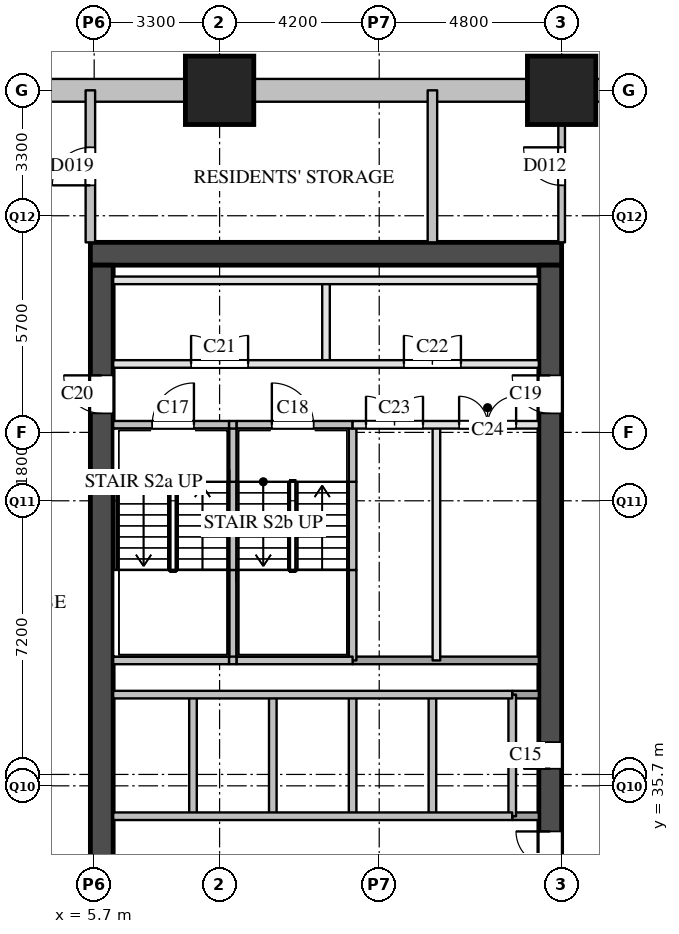
"""IFC4 building model, lengths in metres.
Left out: names, types, materials, properties, quantities, classifications, styles, units other than length and angle.
Written with IfcOpenShell. Run it as: python <this file> out.ifc"""

import sys

from ifc_helpers import new_model, si_unit, direction, frame, frame_2d, origin, origin_2d, place, context, subcontext, project, spatial, rectangle, extrude, element, fill, save


model = new_model("IFC4")
c1 = context("Model", 3, precision=1e-05, world=origin(), true_north=direction((0.0, 1.0)))
c2 = subcontext(c1, "Body", "Model", "MODEL_VIEW")
j1 = project(units=[si_unit("LENGTHUNIT", "METRE"), si_unit("PLANEANGLEUNIT", "RADIAN")], contexts=[c1])
p1 = place(None, origin())
s1 = spatial("IfcSite", under=j1, at=p1, CompositionType="ELEMENT")
p2 = place(p1, origin())
s2 = spatial("IfcBuilding", under=s1, at=p2, CompositionType="ELEMENT")
p3 = place(p2, frame((0.0, 0.0, -6.0)))
s3 = spatial("IfcBuildingStorey", under=s2, at=p3, CompositionType="ELEMENT", Elevation=-6.0)
for number, where, z_axis, x_axis in (
    (1, (9.0, 54.0, 0.0), (0.0, 0.0, 1.0), (1.0, 0.0, 0.0)),
    (2, (18.0, 54.0, 0.0), (0.0, 0.0, 1.0), (1.0, 0.0, 0.0)),
):
    element("IfcColumn", number, at=place(p3, frame(where, z_axis=z_axis, x_axis=x_axis)), inside=s3, PredefinedType="COLUMN", context=c2, shape_type="SweptSolid", body=[
        extrude(rectangle(XDim=1.8, YDim=1.8, at=origin_2d()), origin(), (0.0, 0.0, 1.0), 6.0),
    ])
for number, where, z_axis, x_axis in (
    (3, (26.1, 54.0, 0.0), (0.0, 0.0, 1.0), (-1.0, 0.0, 0.0)),
    (4, (17.1, 54.0, 0.0), (0.0, 0.0, 1.0), (-1.0, 0.0, 0.0)),
):
    element("IfcWall", number, at=place(p3, frame(where, z_axis=z_axis, x_axis=x_axis)), inside=s3, PredefinedType="SOLIDWALL", context=c2, shape_type="SweptSolid", body=[
        extrude(rectangle(XDim=7.2, YDim=0.6, at=frame_2d((3.6, 0.0))), origin(), (0.0, 0.0, 1.0), 5.59),
    ])
p4 = place(p3, frame((8.1, 54.0, 0.0), z_axis=(0.0, 0.0, 1.0), x_axis=(-1.0, 0.0, 0.0)))
e5 = element("IfcWall", 5, at=p4, inside=s3, PredefinedType="SOLIDWALL", context=c2, shape_type="SweptSolid", body=[
    extrude(rectangle(XDim=3.6, YDim=0.6, at=frame_2d((1.8, 0.0))), origin(), (0.0, 0.0, 1.0), 5.59),
])
p5 = place(p3, frame((5.6, 49.7, 0.0), z_axis=(0.0, 0.0, 1.0), x_axis=(1.0, 0.0, 0.0)))
e6 = element("IfcWall", 6, at=p5, inside=s3, PredefinedType="SHEAR", context=c2, shape_type="SweptSolid", body=[
    extrude(rectangle(XDim=12.4, YDim=0.6, at=frame_2d((6.2, 0.0))), origin(), (0.0, 0.0, 1.0), 5.59),
])
p6 = place(p3, frame((5.9, 29.1, 0.0), z_axis=(0.0, 0.0, 1.0), x_axis=(0.0, 1.0, 0.0)))
e7 = element("IfcWall", 7, at=p6, inside=s3, PredefinedType="SHEAR", context=c2, shape_type="SweptSolid", body=[
    extrude(rectangle(XDim=20.3, YDim=0.6, at=frame_2d((10.15, 0.0))), origin(), (0.0, 0.0, 1.0), 5.59),
])
p7 = place(p6, frame((16.4, 0.0, 0.0)))
e8 = element("IfcOpeningElement", 8, at=p7, cuts=e7, PredefinedType="OPENING", context=c2, shape_type="SweptSolid", body=[
    extrude(rectangle(XDim=1.0, YDim=2.1, at=frame_2d((0.5, 1.05))), frame((0.0, 0.31, 0.0), z_axis=(0.0, -1.0, 0.0), x_axis=(1.0, 0.0, 0.0)), (0.0, 0.0, 1.0), 0.62),
])
p8 = place(p3, frame((17.7, 29.1, 0.0), z_axis=(0.0, 0.0, 1.0), x_axis=(0.0, 1.0, 0.0)))
e9 = element("IfcWall", 9, at=p8, inside=s3, PredefinedType="SHEAR", context=c2, shape_type="SweptSolid", body=[
    extrude(rectangle(XDim=20.3, YDim=0.6, at=frame_2d((10.15, 0.0))), origin(), (0.0, 0.0, 1.0), 5.59),
])
p9 = place(p8, frame((1.25, 0.0, 0.0)))
e10 = element("IfcOpeningElement", 10, at=p9, cuts=e9, PredefinedType="OPENING", context=c2, shape_type="SweptSolid", body=[
    extrude(rectangle(XDim=0.7, YDim=2.1, at=frame_2d((0.35, 1.05))), frame((0.0, 0.31, 0.0), z_axis=(0.0, -1.0, 0.0), x_axis=(1.0, 0.0, 0.0)), (0.0, 0.0, 1.0), 0.62),
])
p10 = place(p8, frame((7.05, 0.0, 0.0)))
e11 = element("IfcOpeningElement", 11, at=p10, cuts=e9, PredefinedType="OPENING", context=c2, shape_type="SweptSolid", body=[
    extrude(rectangle(XDim=0.7, YDim=2.1, at=frame_2d((0.35, 1.05))), frame((0.0, 0.31, 0.0), z_axis=(0.0, -1.0, 0.0), x_axis=(1.0, 0.0, 0.0)), (0.0, 0.0, 1.0), 0.62),
])
p11 = place(p8, frame((3.6, 0.0, 0.0)))
e12 = element("IfcOpeningElement", 12, at=p11, cuts=e9, PredefinedType="OPENING", context=c2, shape_type="SweptSolid", body=[
    extrude(rectangle(XDim=1.8, YDim=2.1, at=frame_2d((0.9, 1.05))), frame((0.0, 0.31, 0.0), z_axis=(0.0, -1.0, 0.0), x_axis=(1.0, 0.0, 0.0)), (0.0, 0.0, 1.0), 0.62),
])
p12 = place(p8, frame((16.4, 0.0, 0.0)))
e13 = element("IfcOpeningElement", 13, at=p12, cuts=e9, PredefinedType="OPENING", context=c2, shape_type="SweptSolid", body=[
    extrude(rectangle(XDim=1.0, YDim=2.1, at=frame_2d((0.5, 1.05))), frame((0.0, 0.31, 0.0), z_axis=(0.0, -1.0, 0.0), x_axis=(1.0, 0.0, 0.0)), (0.0, 0.0, 1.0), 0.62),
])
p13 = place(p3, frame((8.3, 34.9, 0.0), z_axis=(0.0, 0.0, 1.0), x_axis=(0.0, 1.0, 0.0)))
e14 = element("IfcWall", 14, at=p13, inside=s3, PredefinedType="SOLIDWALL", context=c2, shape_type="SweptSolid", body=[
    extrude(rectangle(XDim=3.2, YDim=0.2, at=frame_2d((1.6, 0.0))), origin(), (0.0, 0.0, 1.0), 5.59),
])
p14 = place(p3, frame((9.35, 39.0, 0.0), z_axis=(0.0, 0.0, 1.0), x_axis=(0.0, 1.0, 0.0)))
e15 = element("IfcWall", 15, at=p14, inside=s3, PredefinedType="SOLIDWALL", context=c2, shape_type="SweptSolid", body=[
    extrude(rectangle(XDim=2.38, YDim=0.2, at=frame_2d((1.19, 0.0))), origin(), (0.0, 0.0, 1.0), 5.59),
])
p15 = place(p3, frame((9.35, 41.38, 0.0), z_axis=(0.0, 0.0, 1.0), x_axis=(0.0, 1.0, 0.0)))
e16 = element("IfcWall", 16, at=p15, inside=s3, PredefinedType="SOLIDWALL", context=c2, shape_type="SweptSolid", body=[
    extrude(rectangle(XDim=2.32, YDim=0.2, at=frame_2d((1.16, 0.0))), origin(), (0.0, 0.0, 1.0), 5.59),
])
p16 = place(p3, frame((9.35, 43.7, 0.0), z_axis=(0.0, 0.0, 1.0), x_axis=(0.0, 1.0, 0.0)))
e17 = element("IfcWall", 17, at=p16, inside=s3, PredefinedType="SOLIDWALL", context=c2, shape_type="SweptSolid", body=[
    extrude(rectangle(XDim=1.5, YDim=0.2, at=frame_2d((0.75, 0.0))), origin(), (0.0, 0.0, 1.0), 5.59),
])
p17 = place(p3, frame((10.4, 34.9, 0.0), z_axis=(0.0, 0.0, 1.0), x_axis=(0.0, 1.0, 0.0)))
e18 = element("IfcWall", 18, at=p17, inside=s3, PredefinedType="SOLIDWALL", context=c2, shape_type="SweptSolid", body=[
    extrude(rectangle(XDim=3.2, YDim=0.2, at=frame_2d((1.6, 0.0))), origin(), (0.0, 0.0, 1.0), 5.59),
])
p18 = place(p3, frame((11.8, 46.8, 0.0), z_axis=(0.0, 0.0, 1.0), x_axis=(0.0, 1.0, 0.0)))
e19 = element("IfcWall", 19, at=p18, inside=s3, PredefinedType="PARTITIONING", context=c2, shape_type="SweptSolid", body=[
    extrude(rectangle(XDim=2.2, YDim=0.2, at=frame_2d((1.1, 0.0))), origin(), (0.0, 0.0, 1.0), 5.59),
])
p19 = place(p3, frame((12.5, 34.9, 0.0), z_axis=(0.0, 0.0, 1.0), x_axis=(0.0, 1.0, 0.0)))
e20 = element("IfcWall", 20, at=p19, inside=s3, PredefinedType="SOLIDWALL", context=c2, shape_type="SweptSolid", body=[
    extrude(rectangle(XDim=3.2, YDim=0.2, at=frame_2d((1.6, 0.0))), origin(), (0.0, 0.0, 1.0), 5.59),
])
p20 = place(p3, frame((12.5, 39.0, 0.0), z_axis=(0.0, 0.0, 1.0), x_axis=(0.0, 1.0, 0.0)))
e21 = element("IfcWall", 21, at=p20, inside=s3, PredefinedType="SOLIDWALL", context=c2, shape_type="SweptSolid", body=[
    extrude(rectangle(XDim=2.38, YDim=0.2, at=frame_2d((1.19, 0.0))), origin(), (0.0, 0.0, 1.0), 5.59),
])
p21 = place(p3, frame((12.5, 41.38, 0.0), z_axis=(0.0, 0.0, 1.0), x_axis=(0.0, 1.0, 0.0)))
e22 = element("IfcWall", 22, at=p21, inside=s3, PredefinedType="SOLIDWALL", context=c2, shape_type="SweptSolid", body=[
    extrude(rectangle(XDim=2.32, YDim=0.2, at=frame_2d((1.16, 0.0))), origin(), (0.0, 0.0, 1.0), 5.59),
])
p22 = place(p3, frame((12.5, 43.7, 0.0), z_axis=(0.0, 0.0, 1.0), x_axis=(0.0, 1.0, 0.0)))
e23 = element("IfcWall", 23, at=p22, inside=s3, PredefinedType="SOLIDWALL", context=c2, shape_type="SweptSolid", body=[
    extrude(rectangle(XDim=1.5, YDim=0.2, at=frame_2d((0.75, 0.0))), origin(), (0.0, 0.0, 1.0), 5.59),
])
p23 = place(p3, frame((14.6, 34.9, 0.0), z_axis=(0.0, 0.0, 1.0), x_axis=(0.0, 1.0, 0.0)))
e24 = element("IfcWall", 24, at=p23, inside=s3, PredefinedType="SOLIDWALL", context=c2, shape_type="SweptSolid", body=[
    extrude(rectangle(XDim=3.2, YDim=0.2, at=frame_2d((1.6, 0.0))), origin(), (0.0, 0.0, 1.0), 5.59),
])
p24 = place(p3, frame((14.705, 39.0, 0.0), z_axis=(0.0, 0.0, 1.0), x_axis=(0.0, 1.0, 0.0)))
e25 = element("IfcWall", 25, at=p24, inside=s3, PredefinedType="PARTITIONING", context=c2, shape_type="SweptSolid", body=[
    extrude(rectangle(XDim=6.2, YDim=0.2, at=frame_2d((3.1, 0.0))), origin(), (0.0, 0.0, 1.0), 5.59),
])
p25 = place(p3, frame((16.7, 34.9, 0.0), z_axis=(0.0, 0.0, 1.0), x_axis=(0.0, 1.0, 0.0)))
e26 = element("IfcWall", 26, at=p25, inside=s3, PredefinedType="SOLIDWALL", context=c2, shape_type="SweptSolid", body=[
    extrude(rectangle(XDim=3.2, YDim=0.2, at=frame_2d((1.6, 0.0))), origin(), (0.0, 0.0, 1.0), 5.59),
])
p26 = place(p3, frame((6.2, 34.9, 0.0), z_axis=(0.0, 0.0, 1.0), x_axis=(1.0, 0.0, 0.0)))
e27 = element("IfcWall", 27, at=p26, inside=s3, PredefinedType="SOLIDWALL", context=c2, shape_type="SweptSolid", body=[
    extrude(rectangle(XDim=10.5, YDim=0.2, at=frame_2d((5.25, 0.0))), origin(), (0.0, 0.0, 1.0), 5.59),
])
p27 = place(p3, frame((16.7, 34.9, 0.0), z_axis=(0.0, 0.0, 1.0), x_axis=(1.0, 0.0, 0.0)))
e28 = element("IfcWall", 28, at=p27, inside=s3, PredefinedType="SOLIDWALL", context=c2, shape_type="SweptSolid", body=[
    extrude(rectangle(XDim=0.7, YDim=0.2, at=frame_2d((0.35, 0.0))), origin(), (0.0, 0.0, 1.0), 5.59),
])
p28 = place(p3, frame((6.2, 38.1, 0.0), z_axis=(0.0, 0.0, 1.0), x_axis=(1.0, 0.0, 0.0)))
e29 = element("IfcWall", 29, at=p28, inside=s3, PredefinedType="SOLIDWALL", context=c2, shape_type="SweptSolid", body=[
    extrude(rectangle(XDim=10.5, YDim=0.2, at=frame_2d((5.25, 0.0))), origin(), (0.0, 0.0, 1.0), 5.59),
])
p29 = place(p3, frame((16.7, 38.1, 0.0), z_axis=(0.0, 0.0, 1.0), x_axis=(1.0, 0.0, 0.0)))
e30 = element("IfcWall", 30, at=p29, inside=s3, PredefinedType="SOLIDWALL", context=c2, shape_type="SweptSolid", body=[
    extrude(rectangle(XDim=0.7, YDim=0.2, at=frame_2d((0.35, 0.0))), origin(), (0.0, 0.0, 1.0), 5.59),
])
p30 = place(p3, frame((12.5, 39.0, 0.0), z_axis=(0.0, 0.0, 1.0), x_axis=(1.0, 0.0, 0.0)))
e31 = element("IfcWall", 31, at=p30, inside=s3, PredefinedType="SOLIDWALL", context=c2, shape_type="SweptSolid", body=[
    extrude(rectangle(XDim=4.9, YDim=0.2, at=frame_2d((2.45, 0.0))), origin(), (0.0, 0.0, 1.0), 5.59),
])
p31 = place(p3, frame((6.2, 39.0, 0.0), z_axis=(0.0, 0.0, 1.0), x_axis=(1.0, 0.0, 0.0)))
e32 = element("IfcWall", 32, at=p31, inside=s3, PredefinedType="SOLIDWALL", context=c2, shape_type="SweptSolid", body=[
    extrude(rectangle(XDim=3.05, YDim=0.2, at=frame_2d((1.525, 0.0))), origin(), (0.0, 0.0, 1.0), 5.59),
])
p32 = place(p3, frame((9.25, 39.0, 0.0), z_axis=(0.0, 0.0, 1.0), x_axis=(1.0, 0.0, 0.0)))
e33 = element("IfcWall", 33, at=p32, inside=s3, PredefinedType="SOLIDWALL", context=c2, shape_type="SweptSolid", body=[
    extrude(rectangle(XDim=0.2, YDim=0.2, at=frame_2d((0.1, 0.0))), origin(), (0.0, 0.0, 1.0), 5.59),
])
p33 = place(p3, frame((9.45, 39.0, 0.0), z_axis=(0.0, 0.0, 1.0), x_axis=(1.0, 0.0, 0.0)))
e34 = element("IfcWall", 34, at=p33, inside=s3, PredefinedType="SOLIDWALL", context=c2, shape_type="SweptSolid", body=[
    extrude(rectangle(XDim=3.05, YDim=0.2, at=frame_2d((1.525, 0.0))), origin(), (0.0, 0.0, 1.0), 5.59),
])
p34 = place(p3, frame((12.5, 45.2, 0.0), z_axis=(0.0, 0.0, 1.0), x_axis=(1.0, 0.0, 0.0)))
e35 = element("IfcWall", 35, at=p34, inside=s3, PredefinedType="PARTITIONING", context=c2, shape_type="SweptSolid", body=[
    extrude(rectangle(XDim=4.9, YDim=0.2, at=frame_2d((2.45, 0.0))), origin(), (0.0, 0.0, 1.0), 5.59),
])
p35 = place(p34, frame((0.353, 0.0, 0.0)))
e36 = element("IfcOpeningElement", 36, at=p35, cuts=e35, PredefinedType="OPENING", context=c2, shape_type="SweptSolid", body=[
    extrude(rectangle(XDim=1.5, YDim=2.1, at=frame_2d((0.75, 1.05))), frame((0.0, 0.11, 0.0), z_axis=(0.0, -1.0, 0.0), x_axis=(1.0, 0.0, 0.0)), (0.0, 0.0, 1.0), 0.22),
])
p36 = place(p34, frame((2.802, 0.0, 0.0)))
e37 = element("IfcOpeningElement", 37, at=p36, cuts=e35, PredefinedType="OPENING", context=c2, shape_type="SweptSolid", body=[
    extrude(rectangle(XDim=1.5, YDim=2.1, at=frame_2d((0.75, 1.05))), frame((0.0, 0.11, 0.0), z_axis=(0.0, -1.0, 0.0), x_axis=(1.0, 0.0, 0.0)), (0.0, 0.0, 1.0), 0.22),
])
p37 = place(p3, frame((6.2, 45.2, 0.0), z_axis=(0.0, 0.0, 1.0), x_axis=(1.0, 0.0, 0.0)))
e38 = element("IfcWall", 38, at=p37, inside=s3, PredefinedType="SOLIDWALL", context=c2, shape_type="SweptSolid", body=[
    extrude(rectangle(XDim=3.05, YDim=0.2, at=frame_2d((1.525, 0.0))), origin(), (0.0, 0.0, 1.0), 5.59),
])
p38 = place(p37, frame((1.025, 0.0, 0.0)))
e39 = element("IfcOpeningElement", 39, at=p38, cuts=e38, PredefinedType="OPENING", context=c2, shape_type="SweptSolid", body=[
    extrude(rectangle(XDim=1.1, YDim=2.1, at=frame_2d((0.55, 1.05))), frame((0.0, 0.11, 0.0), z_axis=(0.0, -1.0, 0.0), x_axis=(1.0, 0.0, 0.0)), (0.0, 0.0, 1.0), 0.22),
])
p39 = place(p3, frame((9.25, 45.2, 0.0), z_axis=(0.0, 0.0, 1.0), x_axis=(1.0, 0.0, 0.0)))
e40 = element("IfcWall", 40, at=p39, inside=s3, PredefinedType="SOLIDWALL", context=c2, shape_type="SweptSolid", body=[
    extrude(rectangle(XDim=0.2, YDim=0.2, at=frame_2d((0.1, 0.0))), origin(), (0.0, 0.0, 1.0), 5.59),
])
p40 = place(p3, frame((9.45, 45.2, 0.0), z_axis=(0.0, 0.0, 1.0), x_axis=(1.0, 0.0, 0.0)))
e41 = element("IfcWall", 41, at=p40, inside=s3, PredefinedType="SOLIDWALL", context=c2, shape_type="SweptSolid", body=[
    extrude(rectangle(XDim=3.05, YDim=0.2, at=frame_2d((1.525, 0.0))), origin(), (0.0, 0.0, 1.0), 5.59),
])
p41 = place(p40, frame((0.925, 0.0, 0.0)))
e42 = element("IfcOpeningElement", 42, at=p41, cuts=e41, PredefinedType="OPENING", context=c2, shape_type="SweptSolid", body=[
    extrude(rectangle(XDim=1.1, YDim=2.1, at=frame_2d((0.55, 1.05))), frame((0.0, 0.11, 0.0), z_axis=(0.0, -1.0, 0.0), x_axis=(1.0, 0.0, 0.0)), (0.0, 0.0, 1.0), 0.22),
])
p42 = place(p3, frame((6.2, 46.8, 0.0), z_axis=(0.0, 0.0, 1.0), x_axis=(1.0, 0.0, 0.0)))
e43 = element("IfcWall", 43, at=p42, inside=s3, PredefinedType="PARTITIONING", context=c2, shape_type="SweptSolid", body=[
    extrude(rectangle(XDim=11.2, YDim=0.2, at=frame_2d((5.6, 0.0))), origin(), (0.0, 0.0, 1.0), 5.59),
])
p43 = place(p42, frame((2.05, 0.0, 0.0)))
e44 = element("IfcOpeningElement", 44, at=p43, cuts=e43, PredefinedType="OPENING", context=c2, shape_type="SweptSolid", body=[
    extrude(rectangle(XDim=1.5, YDim=2.1, at=frame_2d((0.75, 1.05))), frame((0.0, 0.11, 0.0), z_axis=(0.0, -1.0, 0.0), x_axis=(1.0, 0.0, 0.0)), (0.0, 0.0, 1.0), 0.22),
])
p44 = place(p42, frame((7.65, 0.0, 0.0)))
e45 = element("IfcOpeningElement", 45, at=p44, cuts=e43, PredefinedType="OPENING", context=c2, shape_type="SweptSolid", body=[
    extrude(rectangle(XDim=1.5, YDim=2.1, at=frame_2d((0.75, 1.05))), frame((0.0, 0.11, 0.0), z_axis=(0.0, -1.0, 0.0), x_axis=(1.0, 0.0, 0.0)), (0.0, 0.0, 1.0), 0.22),
])
p45 = place(p3, frame((6.2, 49.0, 0.0), z_axis=(0.0, 0.0, 1.0), x_axis=(1.0, 0.0, 0.0)))
e46 = element("IfcWall", 46, at=p45, inside=s3, PredefinedType="PARTITIONING", context=c2, shape_type="SweptSolid", body=[
    extrude(rectangle(XDim=11.2, YDim=0.2, at=frame_2d((5.6, 0.0))), origin(), (0.0, 0.0, 1.0), 5.59),
])
p46 = place(p3, frame((18.0, 50.0, 0.0), z_axis=(0.0, 0.0, 1.0), x_axis=(0.0, 1.0, 0.0)))
e47 = element("IfcWall", 47, at=p46, inside=s3, PredefinedType="PARTITIONING", context=c2, shape_type="SweptSolid", body=[
    extrude(rectangle(XDim=4.0, YDim=0.175, at=frame_2d((2.0, 0.0))), origin(), (0.0, 0.0, 1.0), 5.59),
])
p47 = place(p46, frame((1.5, 0.0, 0.0)))
e48 = element("IfcOpeningElement", 48, at=p47, cuts=e47, PredefinedType="OPENING", context=c2, shape_type="SweptSolid", body=[
    extrude(rectangle(XDim=1.0, YDim=2.1, at=frame_2d((0.5, 1.05))), frame((0.0, 0.097, 0.0), z_axis=(0.0, -1.0, 0.0), x_axis=(1.0, 0.0, 0.0)), (0.0, 0.0, 1.0), 0.195),
])
p48 = place(p3, frame((5.6, 50.0, 0.0), z_axis=(0.0, 0.0, 1.0), x_axis=(0.0, 1.0, 0.0)))
e49 = element("IfcWall", 49, at=p48, inside=s3, PredefinedType="PARTITIONING", context=c2, shape_type="SweptSolid", body=[
    extrude(rectangle(XDim=4.0, YDim=0.25, at=frame_2d((2.0, 0.0))), origin(), (0.0, 0.0, 1.0), 5.59),
])
p49 = place(p48, frame((1.5, 0.0, 0.0)))
e50 = element("IfcOpeningElement", 50, at=p49, cuts=e49, PredefinedType="OPENING", context=c2, shape_type="SweptSolid", body=[
    extrude(rectangle(XDim=1.0, YDim=2.1, at=frame_2d((0.5, 1.05))), frame((0.0, 0.135, 0.0), z_axis=(0.0, -1.0, 0.0), x_axis=(1.0, 0.0, 0.0)), (0.0, 0.0, 1.0), 0.27),
])
p50 = place(p3, frame((14.6, 50.0, 0.0), z_axis=(0.0, 0.0, 1.0), x_axis=(0.0, 1.0, 0.0)))
e51 = element("IfcWall", 51, at=p50, inside=s3, PredefinedType="PARTITIONING", context=c2, shape_type="SweptSolid", body=[
    extrude(rectangle(XDim=4.0, YDim=0.25, at=frame_2d((2.0, 0.0))), origin(), (0.0, 0.0, 1.0), 5.59),
])
p51 = place(p10, origin())
e52 = element("IfcDoor", 52, at=p51, inside=s3, OperationType="SINGLE_SWING_LEFT", PredefinedType="DOOR", context=c2, shape_type="SweptSolid", body=[
    extrude(rectangle(XDim=0.7, YDim=2.1, at=frame_2d((0.35, 1.05))), frame((0.0, 0.025, 0.0), z_axis=(0.0, -1.0, 0.0), x_axis=(1.0, 0.0, 0.0)), (0.0, 0.0, 1.0), 0.05),
])
fill(e11, e52)
p52 = place(p11, origin())
e53 = element("IfcDoor", 53, at=p52, inside=s3, OperationType="DOUBLE_DOOR_SINGLE_SWING", PredefinedType="DOOR", context=c2, shape_type="SweptSolid", body=[
    extrude(rectangle(XDim=1.8, YDim=2.1, at=frame_2d((0.9, 1.05))), frame((0.0, 0.025, 0.0), z_axis=(0.0, -1.0, 0.0), x_axis=(1.0, 0.0, 0.0)), (0.0, 0.0, 1.0), 0.05),
])
fill(e12, e53)
p53 = place(p38, origin())
e54 = element("IfcDoor", 54, at=p53, inside=s3, OperationType="SINGLE_SWING_RIGHT", PredefinedType="DOOR", context=c2, shape_type="SweptSolid", body=[
    extrude(rectangle(XDim=1.1, YDim=2.1, at=frame_2d((0.55, 1.05))), frame((0.0, 0.025, 0.0), z_axis=(0.0, -1.0, 0.0), x_axis=(1.0, 0.0, 0.0)), (0.0, 0.0, 1.0), 0.05),
])
fill(e39, e54)
p54 = place(p41, origin())
e55 = element("IfcDoor", 55, at=p54, inside=s3, OperationType="SINGLE_SWING_LEFT", PredefinedType="DOOR", context=c2, shape_type="SweptSolid", body=[
    extrude(rectangle(XDim=1.1, YDim=2.1, at=frame_2d((0.55, 1.05))), frame((0.0, 0.025, 0.0), z_axis=(0.0, -1.0, 0.0), x_axis=(1.0, 0.0, 0.0)), (0.0, 0.0, 1.0), 0.05),
])
fill(e42, e55)
p55 = place(p12, origin())
e56 = element("IfcDoor", 56, at=p55, inside=s3, OperationType="SINGLE_SWING_RIGHT", PredefinedType="DOOR", context=c2, shape_type="SweptSolid", body=[
    extrude(rectangle(XDim=1.0, YDim=2.1, at=frame_2d((0.5, 1.05))), frame((0.0, 0.025, 0.0), z_axis=(0.0, -1.0, 0.0), x_axis=(1.0, 0.0, 0.0)), (0.0, 0.0, 1.0), 0.05),
])
fill(e13, e56)
p56 = place(p7, origin())
e57 = element("IfcDoor", 57, at=p56, inside=s3, OperationType="SINGLE_SWING_RIGHT", PredefinedType="DOOR", context=c2, shape_type="SweptSolid", body=[
    extrude(rectangle(XDim=1.0, YDim=2.1, at=frame_2d((0.5, 1.05))), frame((0.0, 0.025, 0.0), z_axis=(0.0, -1.0, 0.0), x_axis=(1.0, 0.0, 0.0)), (0.0, 0.0, 1.0), 0.05),
])
fill(e8, e57)
p57 = place(p43, origin())
e58 = element("IfcDoor", 58, at=p57, inside=s3, OperationType="DOUBLE_DOOR_SINGLE_SWING", PredefinedType="DOOR", context=c2, shape_type="SweptSolid", body=[
    extrude(rectangle(XDim=1.5, YDim=2.1, at=frame_2d((0.75, 1.05))), frame((0.0, 0.025, 0.0), z_axis=(0.0, -1.0, 0.0), x_axis=(1.0, 0.0, 0.0)), (0.0, 0.0, 1.0), 0.05),
])
fill(e44, e58)
p58 = place(p44, origin())
e59 = element("IfcDoor", 59, at=p58, inside=s3, OperationType="DOUBLE_DOOR_SINGLE_SWING", PredefinedType="DOOR", context=c2, shape_type="SweptSolid", body=[
    extrude(rectangle(XDim=1.5, YDim=2.1, at=frame_2d((0.75, 1.05))), frame((0.0, 0.025, 0.0), z_axis=(0.0, -1.0, 0.0), x_axis=(1.0, 0.0, 0.0)), (0.0, 0.0, 1.0), 0.05),
])
fill(e45, e59)
p59 = place(p35, origin())
e60 = element("IfcDoor", 60, at=p59, inside=s3, OperationType="DOUBLE_DOOR_SINGLE_SWING", PredefinedType="DOOR", context=c2, shape_type="SweptSolid", body=[
    extrude(rectangle(XDim=1.5, YDim=2.1, at=frame_2d((0.75, 1.05))), frame((0.0, 0.025, 0.0), z_axis=(0.0, -1.0, 0.0), x_axis=(1.0, 0.0, 0.0)), (0.0, 0.0, 1.0), 0.05),
])
fill(e36, e60)
p60 = place(p36, origin())
e61 = element("IfcDoor", 61, at=p60, inside=s3, OperationType="DOUBLE_DOOR_SINGLE_SWING", PredefinedType="DOOR", context=c2, shape_type="SweptSolid", body=[
    extrude(rectangle(XDim=1.5, YDim=2.1, at=frame_2d((0.75, 1.05))), frame((0.0, 0.025, 0.0), z_axis=(0.0, -1.0, 0.0), x_axis=(1.0, 0.0, 0.0)), (0.0, 0.0, 1.0), 0.05),
])
fill(e37, e61)
p61 = place(p47, origin())
e62 = element("IfcDoor", 62, at=p61, inside=s3, OperationType="SINGLE_SWING_RIGHT", PredefinedType="DOOR", context=c2, shape_type="SweptSolid", body=[
    extrude(rectangle(XDim=1.0, YDim=2.1, at=frame_2d((0.5, 1.05))), frame((0.0, 0.025, 0.0), z_axis=(0.0, -1.0, 0.0), x_axis=(1.0, 0.0, 0.0)), (0.0, 0.0, 1.0), 0.05),
])
fill(e48, e62)
p62 = place(p49, origin())
e63 = element("IfcDoor", 63, at=p62, inside=s3, OperationType="SINGLE_SWING_LEFT", PredefinedType="DOOR", context=c2, shape_type="SweptSolid", body=[
    extrude(rectangle(XDim=1.0, YDim=2.1, at=frame_2d((0.5, 1.05))), frame((0.0, 0.025, 0.0), z_axis=(0.0, -1.0, 0.0), x_axis=(1.0, 0.0, 0.0)), (0.0, 0.0, 1.0), 0.05),
])
fill(e50, e63)
save(model, sys.argv[1])
